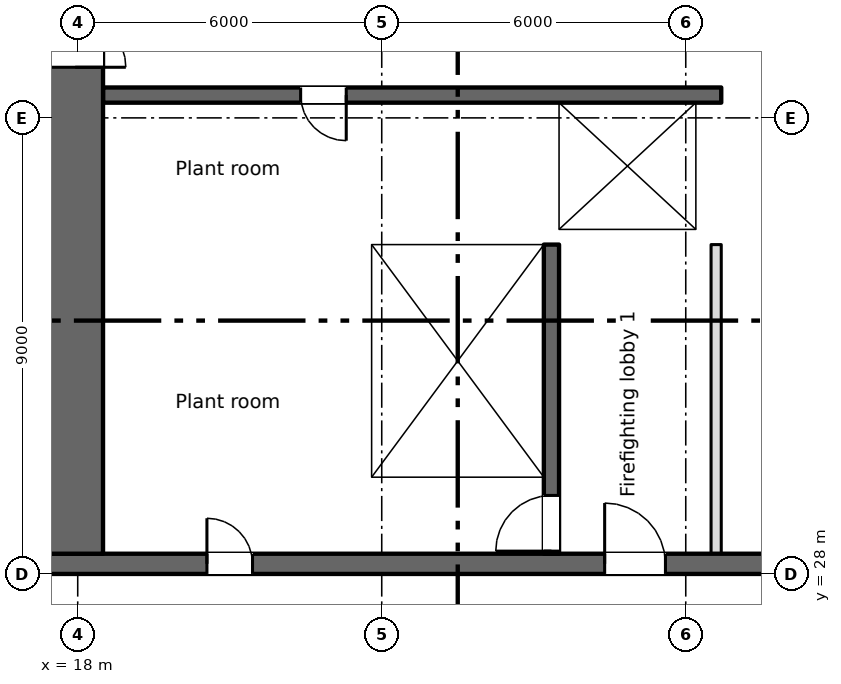
"""IFC4 building model, lengths in metres.
Left out: names, types, materials, properties, quantities, classifications, styles, units other than length and angle.
Written with IfcOpenShell. Run it as: python <this file> out.ifc"""

import sys

from ifc_helpers import new_model, si_unit, direction, frame, frame_2d, origin, place, context, subcontext, project, spatial, rectangle, extrude, element, fill, save


model = new_model("IFC4")
c1 = context("Model", 3, precision=1e-05, world=origin(), true_north=direction((0.0, 1.0)))
c2 = subcontext(c1, "Body", "Model", "MODEL_VIEW")
j1 = project(units=[si_unit("LENGTHUNIT", "METRE"), si_unit("PLANEANGLEUNIT", "RADIAN")], contexts=[c1])
p1 = place(None, origin())
s1 = spatial("IfcSite", under=j1, at=p1, CompositionType="ELEMENT")
p2 = place(p1, origin())
s2 = spatial("IfcBuilding", under=s1, at=p2, CompositionType="ELEMENT")
p3 = place(p2, frame((0.0, 0.0, -6.0)))
s3 = spatial("IfcBuildingStorey", under=s2, at=p3, CompositionType="ELEMENT", Elevation=-6.0)
p4 = place(p3, frame((6.7, 28.2, 0.0), z_axis=(0.0, 0.0, 1.0), x_axis=(1.0, 0.0, 0.0)))
e1 = element("IfcWall", 1, at=p4, inside=s3, PredefinedType="SHEAR", context=c2, shape_type="SweptSolid", body=[
    extrude(rectangle(XDim=66.3, YDim=0.4, at=frame_2d((33.15, 0.0))), origin(), (0.0, 0.0, 1.0), 5.55),
])
p5 = place(p4, frame((13.85, 0.0, 0.0)))
e2 = element("IfcOpeningElement", 2, at=p5, cuts=e1, PredefinedType="OPENING", context=c2, shape_type="SweptSolid", body=[
    extrude(rectangle(XDim=0.9, YDim=2.1, at=frame_2d((0.45, 1.05))), frame((0.0, 0.21, 0.0), z_axis=(0.0, -1.0, 0.0), x_axis=(1.0, 0.0, 0.0)), (0.0, 0.0, 1.0), 0.42),
])
p6 = place(p4, frame((49.85, 0.0, 0.0)))
e3 = element("IfcOpeningElement", 3, at=p6, cuts=e1, PredefinedType="OPENING", context=c2, shape_type="SweptSolid", body=[
    extrude(rectangle(XDim=0.9, YDim=2.1, at=frame_2d((0.45, 1.05))), frame((0.0, 0.21, 0.0), z_axis=(0.0, -1.0, 0.0), x_axis=(1.0, 0.0, 0.0)), (0.0, 0.0, 1.0), 0.42),
])
p7 = place(p4, frame((1.35, 0.0, 0.0)))
e4 = element("IfcOpeningElement", 4, at=p7, cuts=e1, PredefinedType="OPENING", context=c2, shape_type="SweptSolid", body=[
    extrude(rectangle(XDim=0.9, YDim=2.1, at=frame_2d((0.45, 1.05))), frame((0.0, 0.21, 0.0), z_axis=(0.0, -1.0, 0.0), x_axis=(1.0, 0.0, 0.0)), (0.0, 0.0, 1.0), 0.42),
])
p8 = place(p4, frame((59.363, 0.0, 0.0)))
e5 = element("IfcOpeningElement", 5, at=p8, cuts=e1, PredefinedType="OPENING", context=c2, shape_type="SweptSolid", body=[
    extrude(rectangle(XDim=0.9, YDim=2.1, at=frame_2d((0.45, 1.05))), frame((0.0, 0.21, 0.0), z_axis=(0.0, -1.0, 0.0), x_axis=(1.0, 0.0, 0.0)), (0.0, 0.0, 1.0), 0.42),
])
p9 = place(p4, frame((63.538, 0.0, 0.0)))
e6 = element("IfcOpeningElement", 6, at=p9, cuts=e1, PredefinedType="OPENING", context=c2, shape_type="SweptSolid", body=[
    extrude(rectangle(XDim=0.9, YDim=2.1, at=frame_2d((0.45, 1.05))), frame((0.0, 0.21, 0.0), z_axis=(0.0, -1.0, 0.0), x_axis=(1.0, 0.0, 0.0)), (0.0, 0.0, 1.0), 0.42),
])
p10 = place(p4, frame((4.7, 0.0, 0.0)))
e7 = element("IfcOpeningElement", 7, at=p10, cuts=e1, PredefinedType="OPENING", context=c2, shape_type="SweptSolid", body=[
    extrude(rectangle(XDim=1.2, YDim=2.1, at=frame_2d((0.6, 1.05))), frame((0.0, 0.21, 0.0), z_axis=(0.0, -1.0, 0.0), x_axis=(1.0, 0.0, 0.0)), (0.0, 0.0, 1.0), 0.42),
])
p11 = place(p4, frame((31.7, 0.0, 0.0)))
e8 = element("IfcOpeningElement", 8, at=p11, cuts=e1, PredefinedType="OPENING", context=c2, shape_type="SweptSolid", body=[
    extrude(rectangle(XDim=1.2, YDim=2.1, at=frame_2d((0.6, 1.05))), frame((0.0, 0.21, 0.0), z_axis=(0.0, -1.0, 0.0), x_axis=(1.0, 0.0, 0.0)), (0.0, 0.0, 1.0), 0.42),
])
p12 = place(p4, frame((55.2, 0.0, 0.0)))
e9 = element("IfcOpeningElement", 9, at=p12, cuts=e1, PredefinedType="OPENING", context=c2, shape_type="SweptSolid", body=[
    extrude(rectangle(XDim=1.2, YDim=2.1, at=frame_2d((0.6, 1.05))), frame((0.0, 0.21, 0.0), z_axis=(0.0, -1.0, 0.0), x_axis=(1.0, 0.0, 0.0)), (0.0, 0.0, 1.0), 0.42),
])
p13 = place(p4, frame((21.7, 0.0, 0.0)))
e10 = element("IfcOpeningElement", 10, at=p13, cuts=e1, PredefinedType="OPENING", context=c2, shape_type="SweptSolid", body=[
    extrude(rectangle(XDim=1.2, YDim=2.1, at=frame_2d((0.6, 1.05))), frame((0.0, 0.21, 0.0), z_axis=(0.0, -1.0, 0.0), x_axis=(1.0, 0.0, 0.0)), (0.0, 0.0, 1.0), 0.42),
])
p14 = place(p4, frame((41.7, 0.0, 0.0)))
e11 = element("IfcOpeningElement", 11, at=p14, cuts=e1, PredefinedType="OPENING", context=c2, shape_type="SweptSolid", body=[
    extrude(rectangle(XDim=1.2, YDim=2.1, at=frame_2d((0.6, 1.05))), frame((0.0, 0.21, 0.0), z_axis=(0.0, -1.0, 0.0), x_axis=(1.0, 0.0, 0.0)), (0.0, 0.0, 1.0), 0.42),
])
p15 = place(p4, frame((24.85, 0.0, 0.0)))
e12 = element("IfcOpeningElement", 12, at=p15, cuts=e1, PredefinedType="OPENING", context=c2, shape_type="SweptSolid", body=[
    extrude(rectangle(XDim=2.4, YDim=2.1, at=frame_2d((1.2, 1.05))), frame((0.0, 0.21, 0.0), z_axis=(0.0, -1.0, 0.0), x_axis=(1.0, 0.0, 0.0)), (0.0, 0.0, 1.0), 0.42),
])
p16 = place(p4, frame((37.35, 0.0, 0.0)))
e13 = element("IfcOpeningElement", 13, at=p16, cuts=e1, PredefinedType="OPENING", context=c2, shape_type="SweptSolid", body=[
    extrude(rectangle(XDim=2.4, YDim=2.1, at=frame_2d((1.2, 1.05))), frame((0.0, 0.21, 0.0), z_axis=(0.0, -1.0, 0.0), x_axis=(1.0, 0.0, 0.0)), (0.0, 0.0, 1.0), 0.42),
])
p17 = place(p4, frame((7.8, 0.0, 0.0)))
e14 = element("IfcOpeningElement", 14, at=p17, cuts=e1, PredefinedType="OPENING", context=c2, shape_type="SweptSolid", body=[
    extrude(rectangle(XDim=2.4, YDim=2.1, at=frame_2d((1.2, 1.05))), frame((0.0, 0.21, 0.0), z_axis=(0.0, -1.0, 0.0), x_axis=(1.0, 0.0, 0.0)), (0.0, 0.0, 1.0), 0.42),
])
p18 = place(p4, frame((28.85, 0.0, 0.0)))
e15 = element("IfcOpeningElement", 15, at=p18, cuts=e1, PredefinedType="OPENING", context=c2, shape_type="SweptSolid", body=[
    extrude(rectangle(XDim=0.9, YDim=2.1, at=frame_2d((0.45, 1.05))), frame((0.0, 0.21, 0.0), z_axis=(0.0, -1.0, 0.0), x_axis=(1.0, 0.0, 0.0)), (0.0, 0.0, 1.0), 0.42),
])
p19 = place(p4, frame((34.85, 0.0, 0.0)))
e16 = element("IfcOpeningElement", 16, at=p19, cuts=e1, PredefinedType="OPENING", context=c2, shape_type="SweptSolid", body=[
    extrude(rectangle(XDim=0.9, YDim=2.1, at=frame_2d((0.45, 1.05))), frame((0.0, 0.21, 0.0), z_axis=(0.0, -1.0, 0.0), x_axis=(1.0, 0.0, 0.0)), (0.0, 0.0, 1.0), 0.42),
])
p20 = place(p3, frame((17.95, 28.4, 0.0), z_axis=(0.0, 0.0, 1.0), x_axis=(0.0, 1.0, 0.0)))
e17 = element("IfcWall", 17, at=p20, inside=s3, PredefinedType="SHEAR", context=c2, shape_type="SweptSolid", body=[
    extrude(rectangle(XDim=17.1, YDim=1.1, at=frame_2d((8.55, 0.0))), origin(), (0.0, 0.0, 1.0), 5.55),
])
p21 = place(p20, frame((9.6, 0.0, 0.0)))
e18 = element("IfcOpeningElement", 18, at=p21, cuts=e17, PredefinedType="OPENING", context=c2, shape_type="SweptSolid", body=[
    extrude(rectangle(XDim=2.0, YDim=2.1, at=frame_2d((1.0, 1.05))), frame((0.0, 0.56, 0.0), z_axis=(0.0, -1.0, 0.0), x_axis=(1.0, 0.0, 0.0)), (0.0, 0.0, 1.0), 1.12),
])
p22 = place(p20, frame((15.45, 0.0, 0.0)))
e19 = element("IfcOpeningElement", 19, at=p22, cuts=e17, PredefinedType="OPENING", context=c2, shape_type="SweptSolid", body=[
    extrude(rectangle(XDim=1.2, YDim=2.1, at=frame_2d((0.6, 1.05))), frame((0.0, 0.56, 0.0), z_axis=(0.0, -1.0, 0.0), x_axis=(1.0, 0.0, 0.0)), (0.0, 0.0, 1.0), 1.12),
])
p23 = place(p3, frame((23.65, 28.4, 0.0), z_axis=(0.0, 0.0, 1.0), x_axis=(0.0, 1.0, 0.0)))
e20 = element("IfcWall", 20, at=p23, inside=s3, PredefinedType="SHEAR", context=c2, shape_type="SweptSolid", body=[
    extrude(rectangle(XDim=6.1, YDim=0.3, at=frame_2d((3.05, 0.0))), origin(), (0.0, 0.0, 1.0), 5.55),
])
p24 = place(p3, frame((27.35, 28.4, 0.0), z_axis=(0.0, 0.0, 1.0), x_axis=(0.0, 1.0, 0.0)))
e21 = element("IfcWall", 21, at=p24, inside=s3, PredefinedType="SHEAR", context=c2, shape_type="SweptSolid", body=[
    extrude(rectangle(XDim=6.1, YDim=0.3, at=frame_2d((3.05, 0.0))), origin(), (0.0, 0.0, 1.0), 5.55),
])
p25 = place(p24, frame((0.05, 0.0, 0.0)))
e22 = element("IfcOpeningElement", 22, at=p25, cuts=e21, PredefinedType="OPENING", context=c2, shape_type="SweptSolid", body=[
    extrude(rectangle(XDim=1.1, YDim=2.1, at=frame_2d((0.55, 1.05))), frame((0.0, 0.16, 0.0), z_axis=(0.0, -1.0, 0.0), x_axis=(1.0, 0.0, 0.0)), (0.0, 0.0, 1.0), 0.32),
])
p26 = place(p3, frame((18.5, 34.65, 0.0), z_axis=(0.0, 0.0, 1.0), x_axis=(1.0, 0.0, 0.0)))
e23 = element("IfcWall", 23, at=p26, inside=s3, PredefinedType="SHEAR", context=c2, shape_type="SweptSolid", body=[
    extrude(rectangle(XDim=12.2, YDim=0.3, at=frame_2d((6.1, 0.0))), origin(), (0.0, 0.0, 1.0), 5.55),
])
p27 = place(p26, frame((9.8, 0.0, 0.0)))
e24 = element("IfcOpeningElement", 24, at=p27, cuts=e23, PredefinedType="OPENING", context=c2, shape_type="SweptSolid", body=[
    extrude(rectangle(XDim=1.1, YDim=2.1, at=frame_2d((0.55, 1.05))), frame((0.0, 0.16, 0.0), z_axis=(0.0, -1.0, 0.0), x_axis=(1.0, 0.0, 0.0)), (0.0, 0.0, 1.0), 0.32),
])
p28 = place(p3, frame((30.7, 37.45, 0.0), z_axis=(0.0, 0.0, 1.0), x_axis=(-1.0, 0.0, 0.0)))
e25 = element("IfcWall", 25, at=p28, inside=s3, PredefinedType="SHEAR", context=c2, shape_type="SweptSolid", body=[
    extrude(rectangle(XDim=12.2, YDim=0.3, at=frame_2d((6.1, 0.0))), origin(), (0.0, 0.0, 1.0), 5.55),
])
p29 = place(p28, frame((7.4, 0.0, 0.0)))
e26 = element("IfcOpeningElement", 26, at=p29, cuts=e25, PredefinedType="OPENING", context=c2, shape_type="SweptSolid", body=[
    extrude(rectangle(XDim=0.9, YDim=2.1, at=frame_2d((0.45, 1.05))), frame((0.0, 0.16, 0.0), z_axis=(0.0, -1.0, 0.0), x_axis=(1.0, 0.0, 0.0)), (0.0, 0.0, 1.0), 0.32),
])
p30 = place(p3, frame((27.35, 34.8, 0.0), z_axis=(0.0, 0.0, 1.0), x_axis=(0.0, 1.0, 0.0)))
e27 = element("IfcWall", 27, at=p30, inside=s3, PredefinedType="SHEAR", context=c2, shape_type="SweptSolid", body=[
    extrude(rectangle(XDim=2.5, YDim=0.3, at=frame_2d((1.25, 0.0))), origin(), (0.0, 0.0, 1.0), 5.55),
])
p31 = place(p3, frame((30.45, 34.8, 0.0), z_axis=(0.0, 0.0, 1.0), x_axis=(0.0, 1.0, 0.0)))
e28 = element("IfcWall", 28, at=p31, inside=s3, PredefinedType="SHEAR", context=c2, shape_type="SweptSolid", body=[
    extrude(rectangle(XDim=2.5, YDim=0.5, at=frame_2d((1.25, 0.0))), origin(), (0.0, 0.0, 1.0), 5.55),
])
p32 = place(p3, frame((30.6, 28.4, 0.0), z_axis=(0.0, 0.0, 1.0), x_axis=(0.0, 1.0, 0.0)))
e29 = element("IfcWall", 29, at=p32, inside=s3, PredefinedType="PARTITIONING", context=c2, shape_type="SweptSolid", body=[
    extrude(rectangle(XDim=6.1, YDim=0.2, at=frame_2d((3.05, 0.0))), origin(), (0.0, 0.0, 1.0), 5.55),
])
p33 = place(p5, origin())
e30 = element("IfcDoor", 30, at=p33, inside=s3, OperationType="SINGLE_SWING_LEFT", PredefinedType="DOOR", context=c2, shape_type="SweptSolid", body=[
    extrude(rectangle(XDim=0.9, YDim=2.1, at=frame_2d((0.45, 1.05))), frame((0.0, 0.025, 0.0), z_axis=(0.0, -1.0, 0.0), x_axis=(1.0, 0.0, 0.0)), (0.0, 0.0, 1.0), 0.05),
])
fill(e2, e30)
p34 = place(p29, origin())
e31 = element("IfcDoor", 31, at=p34, inside=s3, OperationType="SINGLE_SWING_LEFT", PredefinedType="DOOR", context=c2, shape_type="SweptSolid", body=[
    extrude(rectangle(XDim=0.9, YDim=2.1, at=frame_2d((0.45, 1.05))), frame((0.0, 0.025, 0.0), z_axis=(0.0, -1.0, 0.0), x_axis=(1.0, 0.0, 0.0)), (0.0, 0.0, 1.0), 0.05),
])
fill(e26, e31)
p35 = place(p27, origin())
e32 = element("IfcDoor", 32, at=p35, inside=s3, OperationType="SLIDING_TO_LEFT", PredefinedType="DOOR", context=c2, shape_type="SweptSolid", body=[
    extrude(rectangle(XDim=1.1, YDim=2.1, at=frame_2d((0.55, 1.05))), frame((0.0, 0.025, 0.0), z_axis=(0.0, -1.0, 0.0), x_axis=(1.0, 0.0, 0.0)), (0.0, 0.0, 1.0), 0.05),
])
fill(e24, e32)
p36 = place(p25, origin())
e33 = element("IfcDoor", 33, at=p36, inside=s3, OperationType="SINGLE_SWING_LEFT", PredefinedType="DOOR", context=c2, shape_type="SweptSolid", body=[
    extrude(rectangle(XDim=1.1, YDim=2.1, at=frame_2d((0.55, 1.05))), frame((0.0, 0.025, 0.0), z_axis=(0.0, -1.0, 0.0), x_axis=(1.0, 0.0, 0.0)), (0.0, 0.0, 1.0), 0.05),
])
fill(e22, e33)
p37 = place(p13, origin())
e34 = element("IfcDoor", 34, at=p37, inside=s3, OperationType="SINGLE_SWING_LEFT", PredefinedType="DOOR", context=c2, shape_type="SweptSolid", body=[
    extrude(rectangle(XDim=1.2, YDim=2.1, at=frame_2d((0.6, 1.05))), frame((0.0, 0.025, 0.0), z_axis=(0.0, -1.0, 0.0), x_axis=(1.0, 0.0, 0.0)), (0.0, 0.0, 1.0), 0.05),
])
fill(e10, e34)
p38 = place(p21, origin())
e35 = element("IfcDoor", 35, at=p38, inside=s3, OperationType="DOUBLE_DOOR_SINGLE_SWING", PredefinedType="DOOR", context=c2, shape_type="SweptSolid", body=[
    extrude(rectangle(XDim=2.0, YDim=2.1, at=frame_2d((1.0, 1.05))), frame((0.0, 0.025, 0.0), z_axis=(0.0, -1.0, 0.0), x_axis=(1.0, 0.0, 0.0)), (0.0, 0.0, 1.0), 0.05),
])
fill(e18, e35)
save(model, sys.argv[1])
